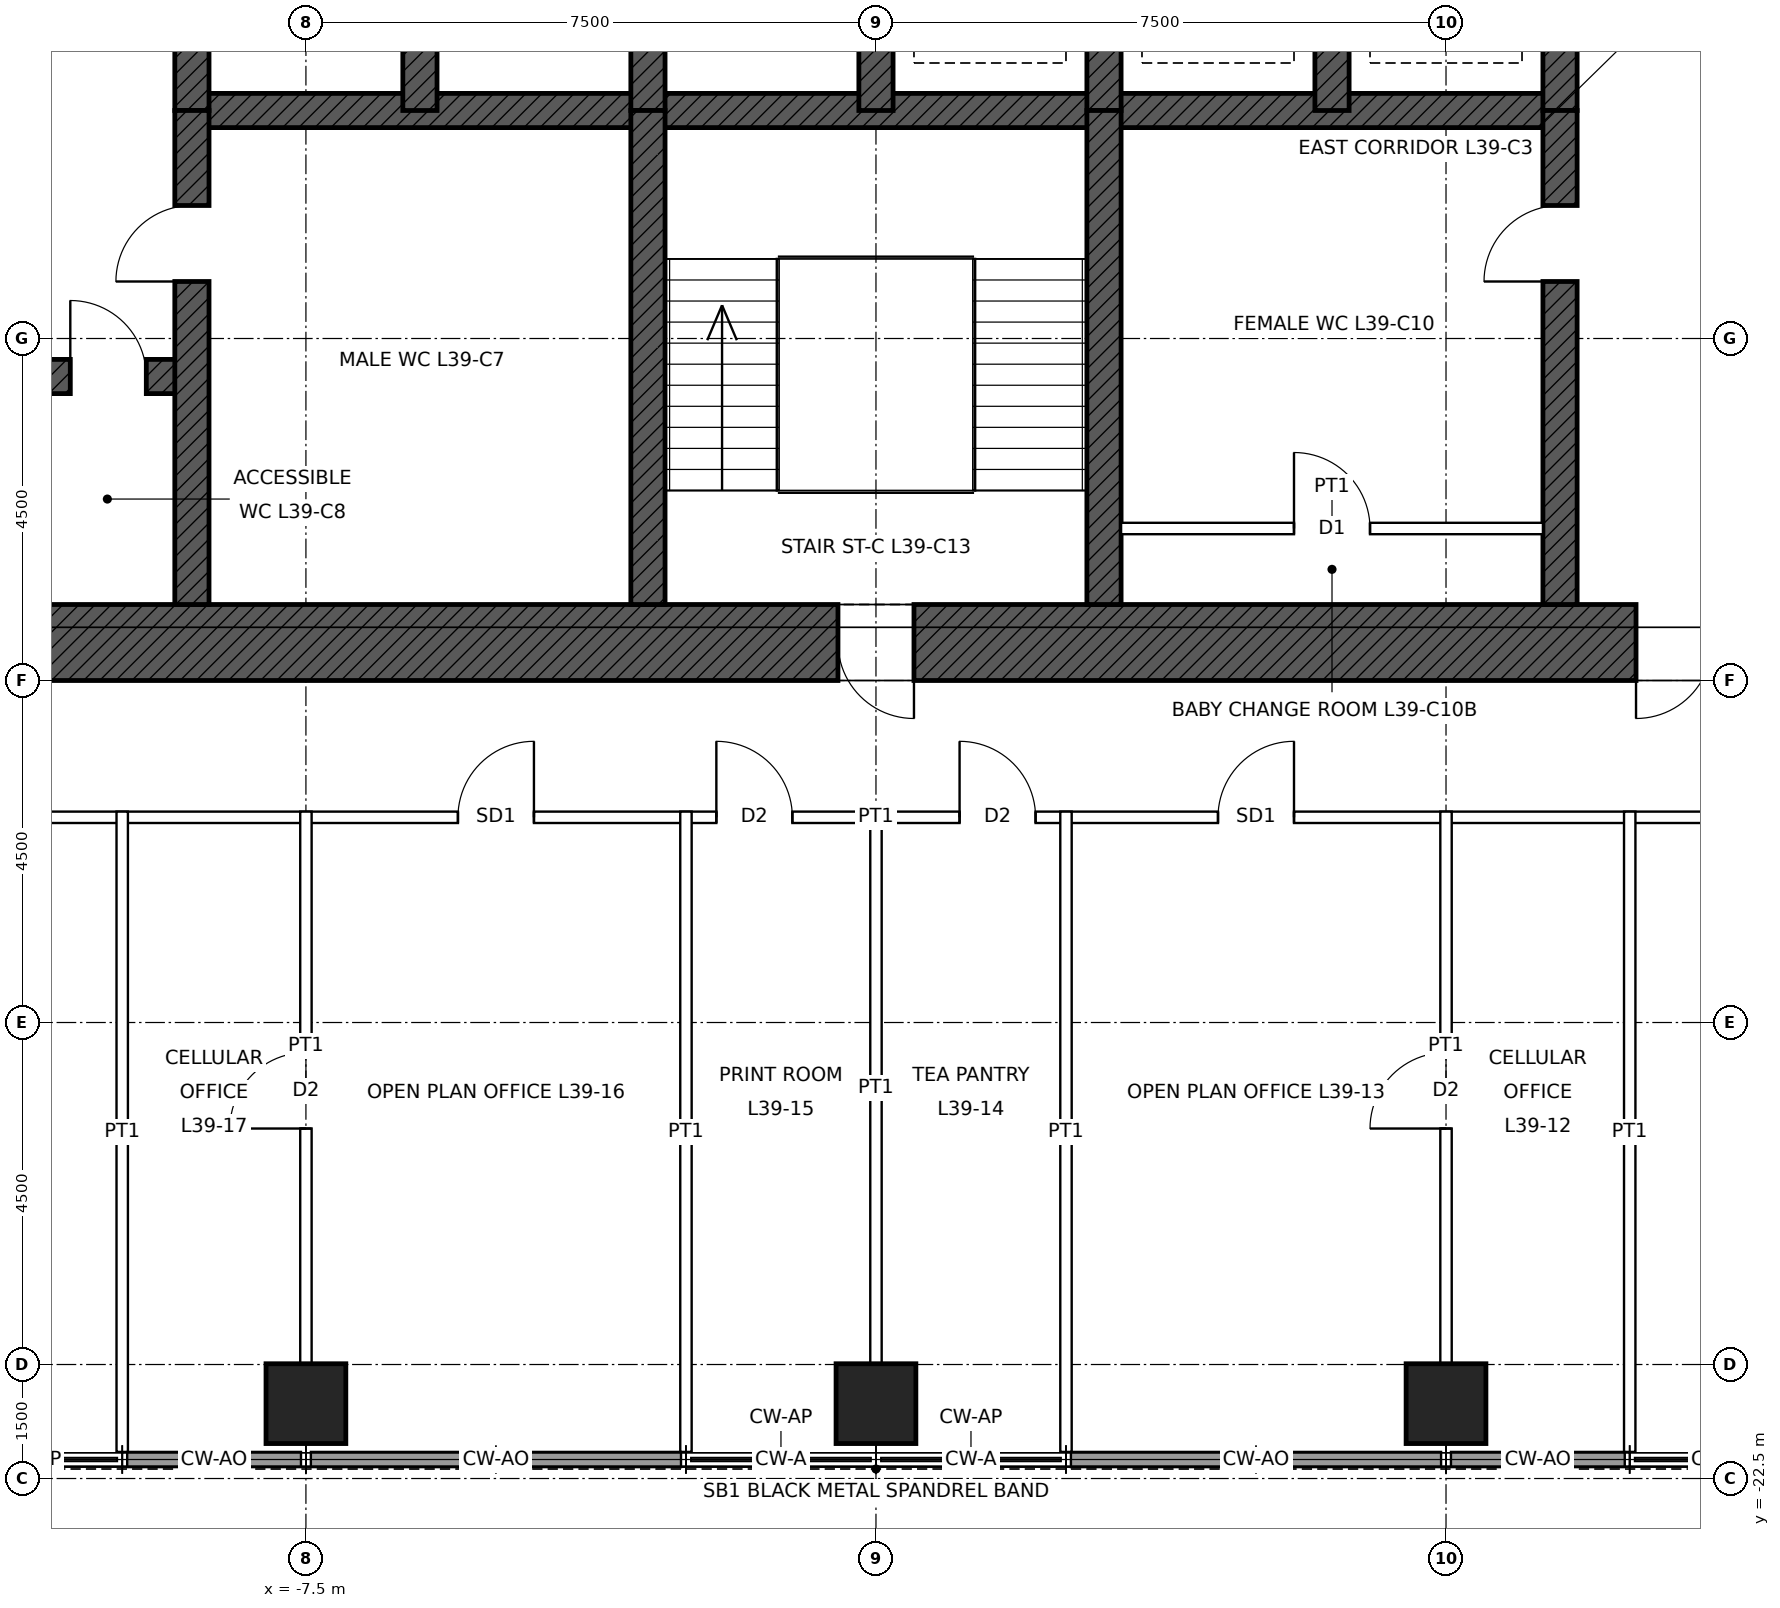
"""IFC4 building model, lengths in metres.
Left out: names, types, materials, properties, quantities, classifications, styles, units other than length and angle.
Written with IfcOpenShell. Run it as: python <this file> out.ifc"""

import sys

from ifc_helpers import new_model, si_unit, direction, frame, frame_2d, origin, origin_2d, place, context, subcontext, project, spatial, rectangle, hollow_rectangle, extrude, element, fill, save


model = new_model("IFC4")
c1 = context("Model", 3, precision=1e-05, world=origin(), true_north=direction((0.0, 1.0)))
c2 = subcontext(c1, "Body", "Model", "MODEL_VIEW")
j1 = project(units=[si_unit("LENGTHUNIT", "METRE"), si_unit("PLANEANGLEUNIT", "RADIAN")], contexts=[c1])
p1 = place(None, origin())
s1 = spatial("IfcSite", under=j1, at=p1, CompositionType="ELEMENT")
p2 = place(p1, origin())
s2 = spatial("IfcBuilding", under=s1, at=p2, CompositionType="ELEMENT")
p3 = place(p2, frame((0.0, 0.0, 189.9)))
s3 = spatial("IfcBuildingStorey", under=s2, at=p3, CompositionType="ELEMENT", Elevation=189.9)
for number, where, z_axis, x_axis in (
    (1, (7.5, -21.515, 0.0), (0.0, 0.0, 1.0), (1.0, 0.0, 0.0)),
    (2, (0.0, -21.515, 0.0), (0.0, 0.0, 1.0), (1.0, 0.0, 0.0)),
    (3, (-7.5, -21.515, 0.0), (0.0, 0.0, 1.0), (1.0, 0.0, 0.0)),
):
    element("IfcColumn", number, at=place(p3, frame(where, z_axis=z_axis, x_axis=x_axis)), inside=s3, PredefinedType="COLUMN", context=c2, shape_type="SweptSolid", body=[
        extrude(hollow_rectangle(XDim=1.05, YDim=1.05, WallThickness=0.07, at=origin_2d()), origin(), (0.0, 0.0, 1.0), 4.0),
    ])
p4 = place(p3, frame((12.0, -11.5, 0.0), z_axis=(0.0, 0.0, 1.0), x_axis=(-1.0, 0.0, 0.0)))
e4 = element("IfcWall", 4, at=p4, inside=s3, PredefinedType="SHEAR", context=c2, shape_type="SweptSolid", body=[
    extrude(rectangle(XDim=24.0, YDim=1.0, at=frame_2d((12.0, 0.0))), origin(), (0.0, 0.0, 1.0), 4.0),
])
p5 = place(p4, frame((11.5, 0.0, 0.0)))
e5 = element("IfcOpeningElement", 5, at=p5, cuts=e4, PredefinedType="OPENING", context=c2, shape_type="SweptSolid", body=[
    extrude(rectangle(XDim=1.0, YDim=2.1, at=frame_2d((0.5, 1.05))), frame((0.0, 0.51, 0.0), z_axis=(0.0, -1.0, 0.0), x_axis=(1.0, 0.0, 0.0)), (0.0, 0.0, 1.0), 1.02),
])
p6 = place(p4, frame((1.0, 0.0, 0.0)))
e6 = element("IfcOpeningElement", 6, at=p6, cuts=e4, PredefinedType="OPENING", context=c2, shape_type="SweptSolid", body=[
    extrude(rectangle(XDim=1.0, YDim=2.4, at=frame_2d((0.5, 1.2))), frame((0.0, 0.51, 0.0), z_axis=(0.0, -1.0, 0.0), x_axis=(1.0, 0.0, 0.0)), (0.0, 0.0, 1.0), 1.02),
])
p7 = place(p3, frame((-9.0, -4.5, 0.0), z_axis=(0.0, 0.0, 1.0), x_axis=(1.0, 0.0, 0.0)))
e7 = element("IfcWall", 7, at=p7, inside=s3, PredefinedType="SHEAR", context=c2, shape_type="SweptSolid", body=[
    extrude(rectangle(XDim=18.0, YDim=0.45, at=frame_2d((9.0, 0.0))), origin(), (0.0, 0.0, 1.0), 4.0),
])
p8 = place(p3, frame((-11.0, -8.0, 0.0), z_axis=(0.0, 0.0, 1.0), x_axis=(1.0, 0.0, 0.0)))
e8 = element("IfcWall", 8, at=p8, inside=s3, PredefinedType="SHEAR", context=c2, shape_type="SweptSolid", body=[
    extrude(rectangle(XDim=2.0, YDim=0.45, at=frame_2d((1.0, 0.0))), origin(), (0.0, 0.0, 1.0), 4.0),
])
p9 = place(p8, frame((0.4, 0.0, 0.0)))
e9 = element("IfcOpeningElement", 9, at=p9, cuts=e8, PredefinedType="OPENING", context=c2, shape_type="SweptSolid", body=[
    extrude(rectangle(XDim=1.0, YDim=2.1, at=frame_2d((0.5, 1.05))), frame((0.0, 0.235, 0.0), z_axis=(0.0, -1.0, 0.0), x_axis=(1.0, 0.0, 0.0)), (0.0, 0.0, 1.0), 0.47),
])
for number, where, z_axis, x_axis in (
    (10, (-9.0, -4.5, 0.0), (0.0, 0.0, 1.0), (0.0, 1.0, 0.0)),
    (11, (9.0, -4.5, 0.0), (0.0, 0.0, 1.0), (0.0, 1.0, 0.0)),
    (12, (-6.0, -4.5, 0.0), (0.0, 0.0, 1.0), (0.0, 1.0, 0.0)),
    (13, (-3.0, -4.5, 0.0), (0.0, 0.0, 1.0), (0.0, 1.0, 0.0)),
    (14, (0.0, -4.5, 0.0), (0.0, 0.0, 1.0), (0.0, 1.0, 0.0)),
    (15, (3.0, -4.5, 0.0), (0.0, 0.0, 1.0), (0.0, 1.0, 0.0)),
    (16, (6.0, -4.5, 0.0), (0.0, 0.0, 1.0), (0.0, 1.0, 0.0)),
):
    element("IfcWall", number, at=place(p3, frame(where, z_axis=z_axis, x_axis=x_axis)), inside=s3, PredefinedType="SHEAR", context=c2, shape_type="SweptSolid", body=[
        extrude(rectangle(XDim=3.0, YDim=0.45, at=frame_2d((1.5, 0.0))), origin(), (0.0, 0.0, 1.0), 4.0),
    ])
p10 = place(p3, frame((-9.0, -11.0, 0.0), z_axis=(0.0, 0.0, 1.0), x_axis=(0.0, 1.0, 0.0)))
e17 = element("IfcWall", 17, at=p10, inside=s3, PredefinedType="SHEAR", context=c2, shape_type="SweptSolid", body=[
    extrude(rectangle(XDim=6.5, YDim=0.45, at=frame_2d((3.25, 0.0))), origin(), (0.0, 0.0, 1.0), 4.0),
])
p11 = place(p10, frame((4.25, 0.0, 0.0)))
e18 = element("IfcOpeningElement", 18, at=p11, cuts=e17, PredefinedType="OPENING", context=c2, shape_type="SweptSolid", body=[
    extrude(rectangle(XDim=1.0, YDim=2.1, at=frame_2d((0.5, 1.05))), frame((0.0, 0.235, 0.0), z_axis=(0.0, -1.0, 0.0), x_axis=(1.0, 0.0, 0.0)), (0.0, 0.0, 1.0), 0.47),
])
p12 = place(p3, frame((9.0, -11.0, 0.0), z_axis=(0.0, 0.0, 1.0), x_axis=(0.0, 1.0, 0.0)))
e19 = element("IfcWall", 19, at=p12, inside=s3, PredefinedType="SHEAR", context=c2, shape_type="SweptSolid", body=[
    extrude(rectangle(XDim=6.5, YDim=0.45, at=frame_2d((3.25, 0.0))), origin(), (0.0, 0.0, 1.0), 4.0),
])
p13 = place(p12, frame((4.25, 0.0, 0.0)))
e20 = element("IfcOpeningElement", 20, at=p13, cuts=e19, PredefinedType="OPENING", context=c2, shape_type="SweptSolid", body=[
    extrude(rectangle(XDim=1.0, YDim=2.1, at=frame_2d((0.5, 1.05))), frame((0.0, 0.235, 0.0), z_axis=(0.0, -1.0, 0.0), x_axis=(1.0, 0.0, 0.0)), (0.0, 0.0, 1.0), 0.47),
])
for number, where, z_axis, x_axis in (
    (21, (-3.0, -11.0, 0.0), (0.0, 0.0, 1.0), (0.0, 1.0, 0.0)),
    (22, (3.0, -11.0, 0.0), (0.0, 0.0, 1.0), (0.0, 1.0, 0.0)),
):
    element("IfcWall", number, at=place(p3, frame(where, z_axis=z_axis, x_axis=x_axis)), inside=s3, PredefinedType="SHEAR", context=c2, shape_type="SweptSolid", body=[
        extrude(rectangle(XDim=6.5, YDim=0.45, at=frame_2d((3.25, 0.0))), origin(), (0.0, 0.0, 1.0), 4.0),
    ])
p14 = place(p3, frame((9.852, -22.25, 0.0), z_axis=(0.0, 0.0, 1.0), x_axis=(-1.0, 0.0, 0.0)))
e23 = element("IfcWall", 23, at=p14, inside=s3, PredefinedType="SOLIDWALL", context=c2, shape_type="SweptSolid", body=[
    extrude(rectangle(XDim=2.287, YDim=0.2, at=frame_2d((1.144, 0.0))), origin(), (0.0, 0.0, 1.0), 3.85),
])
for number, where, z_axis, x_axis in (
    (24, (7.435, -22.25, 0.0), (0.0, 0.0, 1.0), (-1.0, 0.0, 0.0)),
    (25, (4.968, -22.25, 0.0), (0.0, 0.0, 1.0), (-1.0, 0.0, 0.0)),
    (26, (-2.565, -22.25, 0.0), (0.0, 0.0, 1.0), (-1.0, 0.0, 0.0)),
    (27, (-5.032, -22.25, 0.0), (0.0, 0.0, 1.0), (-1.0, 0.0, 0.0)),
):
    element("IfcWall", number, at=place(p3, frame(where, z_axis=z_axis, x_axis=x_axis)), inside=s3, PredefinedType="SOLIDWALL", context=c2, shape_type="SweptSolid", body=[
        extrude(rectangle(XDim=2.403, YDim=0.2, at=frame_2d((1.201, 0.0))), origin(), (0.0, 0.0, 1.0), 3.85),
    ])
p15 = place(p3, frame((-7.565, -22.25, 0.0), z_axis=(0.0, 0.0, 1.0), x_axis=(-1.0, 0.0, 0.0)))
e28 = element("IfcWall", 28, at=p15, inside=s3, PredefinedType="SOLIDWALL", context=c2, shape_type="SweptSolid", body=[
    extrude(rectangle(XDim=2.287, YDim=0.2, at=frame_2d((1.144, 0.0))), origin(), (0.0, 0.0, 1.0), 3.85),
])
p16 = place(p3, frame((-13.875, -13.8, 0.0), z_axis=(0.0, 0.0, 1.0), x_axis=(1.0, 0.0, 0.0)))
e29 = element("IfcWall", 29, at=p16, inside=s3, PredefinedType="PARTITIONING", context=c2, shape_type="SweptSolid", body=[
    extrude(rectangle(XDim=27.75, YDim=0.15, at=frame_2d((13.875, 0.0))), origin(), (0.0, 0.0, 1.0), 3.85),
])
p17 = place(p16, frame((18.375, 0.0, 0.0)))
e30 = element("IfcOpeningElement", 30, at=p17, cuts=e29, PredefinedType="OPENING", context=c2, shape_type="SweptSolid", body=[
    extrude(rectangle(XDim=1.0, YDim=2.4, at=frame_2d((0.5, 1.2))), frame((0.0, 0.085, 0.0), z_axis=(0.0, -1.0, 0.0), x_axis=(1.0, 0.0, 0.0)), (0.0, 0.0, 1.0), 0.17),
])
p18 = place(p16, frame((14.975, 0.0, 0.0)))
e31 = element("IfcOpeningElement", 31, at=p18, cuts=e29, PredefinedType="OPENING", context=c2, shape_type="SweptSolid", body=[
    extrude(rectangle(XDim=1.0, YDim=2.1, at=frame_2d((0.5, 1.05))), frame((0.0, 0.085, 0.0), z_axis=(0.0, -1.0, 0.0), x_axis=(1.0, 0.0, 0.0)), (0.0, 0.0, 1.0), 0.17),
])
p19 = place(p16, frame((11.775, 0.0, 0.0)))
e32 = element("IfcOpeningElement", 32, at=p19, cuts=e29, PredefinedType="OPENING", context=c2, shape_type="SweptSolid", body=[
    extrude(rectangle(XDim=1.0, YDim=2.1, at=frame_2d((0.5, 1.05))), frame((0.0, 0.085, 0.0), z_axis=(0.0, -1.0, 0.0), x_axis=(1.0, 0.0, 0.0)), (0.0, 0.0, 1.0), 0.17),
])
p20 = place(p16, frame((8.375, 0.0, 0.0)))
e33 = element("IfcOpeningElement", 33, at=p20, cuts=e29, PredefinedType="OPENING", context=c2, shape_type="SweptSolid", body=[
    extrude(rectangle(XDim=1.0, YDim=2.4, at=frame_2d((0.5, 1.2))), frame((0.0, 0.085, 0.0), z_axis=(0.0, -1.0, 0.0), x_axis=(1.0, 0.0, 0.0)), (0.0, 0.0, 1.0), 0.17),
])
p21 = place(p16, frame((25.65, 0.0, 0.0)))
e34 = element("IfcOpeningElement", 34, at=p21, cuts=e29, PredefinedType="OPENING", context=c2, shape_type="SweptSolid", body=[
    extrude(rectangle(XDim=1.0, YDim=2.4, at=frame_2d((0.5, 1.2))), frame((0.0, 0.085, 0.0), z_axis=(0.0, -1.0, 0.0), x_axis=(1.0, 0.0, 0.0)), (0.0, 0.0, 1.0), 0.17),
])
p22 = place(p16, frame((1.517, 0.0, 0.0)))
e35 = element("IfcOpeningElement", 35, at=p22, cuts=e29, PredefinedType="OPENING", context=c2, shape_type="SweptSolid", body=[
    extrude(rectangle(XDim=1.0, YDim=2.4, at=frame_2d((0.5, 1.2))), frame((0.0, 0.085, 0.0), z_axis=(0.0, -1.0, 0.0), x_axis=(1.0, 0.0, 0.0)), (0.0, 0.0, 1.0), 0.17),
])
p23 = place(p3, frame((-9.917, -22.15, 0.0), z_axis=(0.0, 0.0, 1.0), x_axis=(0.0, 1.0, 0.0)))
e36 = element("IfcWall", 36, at=p23, inside=s3, PredefinedType="PARTITIONING", context=c2, shape_type="SweptSolid", body=[
    extrude(rectangle(XDim=8.425, YDim=0.15, at=frame_2d((4.212, 0.0))), origin(), (0.0, 0.0, 1.0), 3.85),
])
p24 = place(p3, frame((-7.5, -20.99, 0.0), z_axis=(0.0, 0.0, 1.0), x_axis=(0.0, 1.0, 0.0)))
e37 = element("IfcWall", 37, at=p24, inside=s3, PredefinedType="PARTITIONING", context=c2, shape_type="SweptSolid", body=[
    extrude(rectangle(XDim=7.265, YDim=0.15, at=frame_2d((3.632, 0.0))), origin(), (0.0, 0.0, 1.0), 3.238),
])
p25 = place(p24, frame((3.095, 0.0, 0.0)))
e38 = element("IfcOpeningElement", 38, at=p25, cuts=e37, PredefinedType="OPENING", context=c2, shape_type="SweptSolid", body=[
    extrude(rectangle(XDim=1.0, YDim=2.1, at=frame_2d((0.5, 1.05))), frame((0.0, 0.085, 0.0), z_axis=(0.0, -1.0, 0.0), x_axis=(1.0, 0.0, 0.0)), (0.0, 0.0, 1.0), 0.17),
])
p26 = place(p3, frame((-2.5, -22.15, 0.0), z_axis=(0.0, 0.0, 1.0), x_axis=(0.0, 1.0, 0.0)))
e39 = element("IfcWall", 39, at=p26, inside=s3, PredefinedType="PARTITIONING", context=c2, shape_type="SweptSolid", body=[
    extrude(rectangle(XDim=8.425, YDim=0.15, at=frame_2d((4.212, 0.0))), origin(), (0.0, 0.0, 1.0), 3.85),
])
p27 = place(p3, frame((0.0, -20.99, 0.0), z_axis=(0.0, 0.0, 1.0), x_axis=(0.0, 1.0, 0.0)))
e40 = element("IfcWall", 40, at=p27, inside=s3, PredefinedType="PARTITIONING", context=c2, shape_type="SweptSolid", body=[
    extrude(rectangle(XDim=7.265, YDim=0.15, at=frame_2d((3.632, 0.0))), origin(), (0.0, 0.0, 1.0), 3.238),
])
p28 = place(p3, frame((2.5, -22.15, 0.0), z_axis=(0.0, 0.0, 1.0), x_axis=(0.0, 1.0, 0.0)))
e41 = element("IfcWall", 41, at=p28, inside=s3, PredefinedType="PARTITIONING", context=c2, shape_type="SweptSolid", body=[
    extrude(rectangle(XDim=8.425, YDim=0.15, at=frame_2d((4.212, 0.0))), origin(), (0.0, 0.0, 1.0), 3.85),
])
p29 = place(p3, frame((7.5, -20.99, 0.0), z_axis=(0.0, 0.0, 1.0), x_axis=(0.0, 1.0, 0.0)))
e42 = element("IfcWall", 42, at=p29, inside=s3, PredefinedType="PARTITIONING", context=c2, shape_type="SweptSolid", body=[
    extrude(rectangle(XDim=7.265, YDim=0.15, at=frame_2d((3.632, 0.0))), origin(), (0.0, 0.0, 1.0), 3.238),
])
p30 = place(p29, frame((3.095, 0.0, 0.0)))
e43 = element("IfcOpeningElement", 43, at=p30, cuts=e42, PredefinedType="OPENING", context=c2, shape_type="SweptSolid", body=[
    extrude(rectangle(XDim=1.0, YDim=2.1, at=frame_2d((0.5, 1.05))), frame((0.0, 0.085, 0.0), z_axis=(0.0, -1.0, 0.0), x_axis=(1.0, 0.0, 0.0)), (0.0, 0.0, 1.0), 0.17),
])
p31 = place(p3, frame((9.917, -22.15, 0.0), z_axis=(0.0, 0.0, 1.0), x_axis=(0.0, 1.0, 0.0)))
e44 = element("IfcWall", 44, at=p31, inside=s3, PredefinedType="PARTITIONING", context=c2, shape_type="SweptSolid", body=[
    extrude(rectangle(XDim=8.425, YDim=0.15, at=frame_2d((4.212, 0.0))), origin(), (0.0, 0.0, 1.0), 3.85),
])
p32 = place(p3, frame((3.225, -10.0, 0.0), z_axis=(0.0, 0.0, 1.0), x_axis=(1.0, 0.0, 0.0)))
e45 = element("IfcWall", 45, at=p32, inside=s3, PredefinedType="PARTITIONING", context=c2, shape_type="SweptSolid", body=[
    extrude(rectangle(XDim=5.55, YDim=0.15, at=frame_2d((2.775, 0.0))), origin(), (0.0, 0.0, 1.0), 3.75),
])
p33 = place(p32, frame((2.275, 0.0, 0.0)))
e46 = element("IfcOpeningElement", 46, at=p33, cuts=e45, PredefinedType="OPENING", context=c2, shape_type="SweptSolid", body=[
    extrude(rectangle(XDim=1.0, YDim=2.1, at=frame_2d((0.5, 1.05))), frame((0.0, 0.085, 0.0), z_axis=(0.0, -1.0, 0.0), x_axis=(1.0, 0.0, 0.0)), (0.0, 0.0, 1.0), 0.17),
])
p34 = place(p5, origin())
e47 = element("IfcDoor", 47, at=p34, inside=s3, OperationType="SINGLE_SWING_LEFT", PredefinedType="DOOR", context=c2, shape_type="SweptSolid", body=[
    extrude(rectangle(XDim=1.0, YDim=2.1, at=frame_2d((0.5, 1.05))), frame((0.0, 0.485, 0.0), z_axis=(0.0, -1.0, 0.0), x_axis=(1.0, 0.0, 0.0)), (0.0, 0.0, 1.0), 0.05),
])
fill(e5, e47)
p35 = place(p6, origin())
e48 = element("IfcDoor", 48, at=p35, inside=s3, OperationType="SINGLE_SWING_RIGHT", PredefinedType="DOOR", context=c2, shape_type="SweptSolid", body=[
    extrude(rectangle(XDim=1.0, YDim=2.4, at=frame_2d((0.5, 1.2))), frame((0.0, 0.485, 0.0), z_axis=(0.0, -1.0, 0.0), x_axis=(1.0, 0.0, 0.0)), (0.0, 0.0, 1.0), 0.05),
])
fill(e6, e48)
p36 = place(p11, origin())
e49 = element("IfcDoor", 49, at=p36, inside=s3, OperationType="SINGLE_SWING_LEFT", PredefinedType="DOOR", context=c2, shape_type="SweptSolid", body=[
    extrude(rectangle(XDim=1.0, YDim=2.1, at=frame_2d((0.5, 1.05))), frame((0.0, 0.025, 0.0), z_axis=(0.0, -1.0, 0.0), x_axis=(1.0, 0.0, 0.0)), (0.0, 0.0, 1.0), 0.05),
])
fill(e18, e49)
p37 = place(p13, origin())
e50 = element("IfcDoor", 50, at=p37, inside=s3, OperationType="SINGLE_SWING_LEFT", PredefinedType="DOOR", context=c2, shape_type="SweptSolid", body=[
    extrude(rectangle(XDim=1.0, YDim=2.1, at=frame_2d((0.5, 1.05))), frame((0.0, 0.025, 0.0), z_axis=(0.0, -1.0, 0.0), x_axis=(1.0, 0.0, 0.0)), (0.0, 0.0, 1.0), 0.05),
])
fill(e20, e50)
p38 = place(p9, origin())
e51 = element("IfcDoor", 51, at=p38, inside=s3, OperationType="SINGLE_SWING_LEFT", PredefinedType="DOOR", context=c2, shape_type="SweptSolid", body=[
    extrude(rectangle(XDim=1.0, YDim=2.1, at=frame_2d((0.5, 1.05))), frame((0.0, 0.025, 0.0), z_axis=(0.0, -1.0, 0.0), x_axis=(1.0, 0.0, 0.0)), (0.0, 0.0, 1.0), 0.05),
])
fill(e9, e51)
p39 = place(p33, origin())
e52 = element("IfcDoor", 52, at=p39, inside=s3, OperationType="SINGLE_SWING_LEFT", PredefinedType="DOOR", context=c2, shape_type="SweptSolid", body=[
    extrude(rectangle(XDim=1.0, YDim=2.1, at=frame_2d((0.5, 1.05))), frame((0.0, 0.025, 0.0), z_axis=(0.0, -1.0, 0.0), x_axis=(1.0, 0.0, 0.0)), (0.0, 0.0, 1.0), 0.05),
])
fill(e46, e52)
p40 = place(p30, origin())
e53 = element("IfcDoor", 53, at=p40, inside=s3, OperationType="SINGLE_SWING_LEFT", PredefinedType="DOOR", context=c2, shape_type="SweptSolid", body=[
    extrude(rectangle(XDim=1.0, YDim=2.1, at=frame_2d((0.5, 1.05))), frame((0.0, 0.025, 0.0), z_axis=(0.0, -1.0, 0.0), x_axis=(1.0, 0.0, 0.0)), (0.0, 0.0, 1.0), 0.05),
])
fill(e43, e53)
p41 = place(p17, origin())
e54 = element("IfcDoor", 54, at=p41, inside=s3, OperationType="SINGLE_SWING_RIGHT", PredefinedType="DOOR", context=c2, shape_type="SweptSolid", body=[
    extrude(rectangle(XDim=1.0, YDim=2.4, at=frame_2d((0.5, 1.2))), frame((0.0, 0.025, 0.0), z_axis=(0.0, -1.0, 0.0), x_axis=(1.0, 0.0, 0.0)), (0.0, 0.0, 1.0), 0.05),
])
fill(e30, e54)
p42 = place(p18, origin())
e55 = element("IfcDoor", 55, at=p42, inside=s3, OperationType="SINGLE_SWING_LEFT", PredefinedType="DOOR", context=c2, shape_type="SweptSolid", body=[
    extrude(rectangle(XDim=1.0, YDim=2.1, at=frame_2d((0.5, 1.05))), frame((0.0, 0.025, 0.0), z_axis=(0.0, -1.0, 0.0), x_axis=(1.0, 0.0, 0.0)), (0.0, 0.0, 1.0), 0.05),
])
fill(e31, e55)
p43 = place(p19, origin())
e56 = element("IfcDoor", 56, at=p43, inside=s3, OperationType="SINGLE_SWING_LEFT", PredefinedType="DOOR", context=c2, shape_type="SweptSolid", body=[
    extrude(rectangle(XDim=1.0, YDim=2.1, at=frame_2d((0.5, 1.05))), frame((0.0, 0.025, 0.0), z_axis=(0.0, -1.0, 0.0), x_axis=(1.0, 0.0, 0.0)), (0.0, 0.0, 1.0), 0.05),
])
fill(e32, e56)
p44 = place(p20, origin())
e57 = element("IfcDoor", 57, at=p44, inside=s3, OperationType="SINGLE_SWING_RIGHT", PredefinedType="DOOR", context=c2, shape_type="SweptSolid", body=[
    extrude(rectangle(XDim=1.0, YDim=2.4, at=frame_2d((0.5, 1.2))), frame((0.0, 0.025, 0.0), z_axis=(0.0, -1.0, 0.0), x_axis=(1.0, 0.0, 0.0)), (0.0, 0.0, 1.0), 0.05),
])
fill(e33, e57)
p45 = place(p25, origin())
e58 = element("IfcDoor", 58, at=p45, inside=s3, OperationType="SINGLE_SWING_LEFT", PredefinedType="DOOR", context=c2, shape_type="SweptSolid", body=[
    extrude(rectangle(XDim=1.0, YDim=2.1, at=frame_2d((0.5, 1.05))), frame((0.0, 0.025, 0.0), z_axis=(0.0, -1.0, 0.0), x_axis=(1.0, 0.0, 0.0)), (0.0, 0.0, 1.0), 0.05),
])
fill(e38, e58)
save(model, sys.argv[1])
